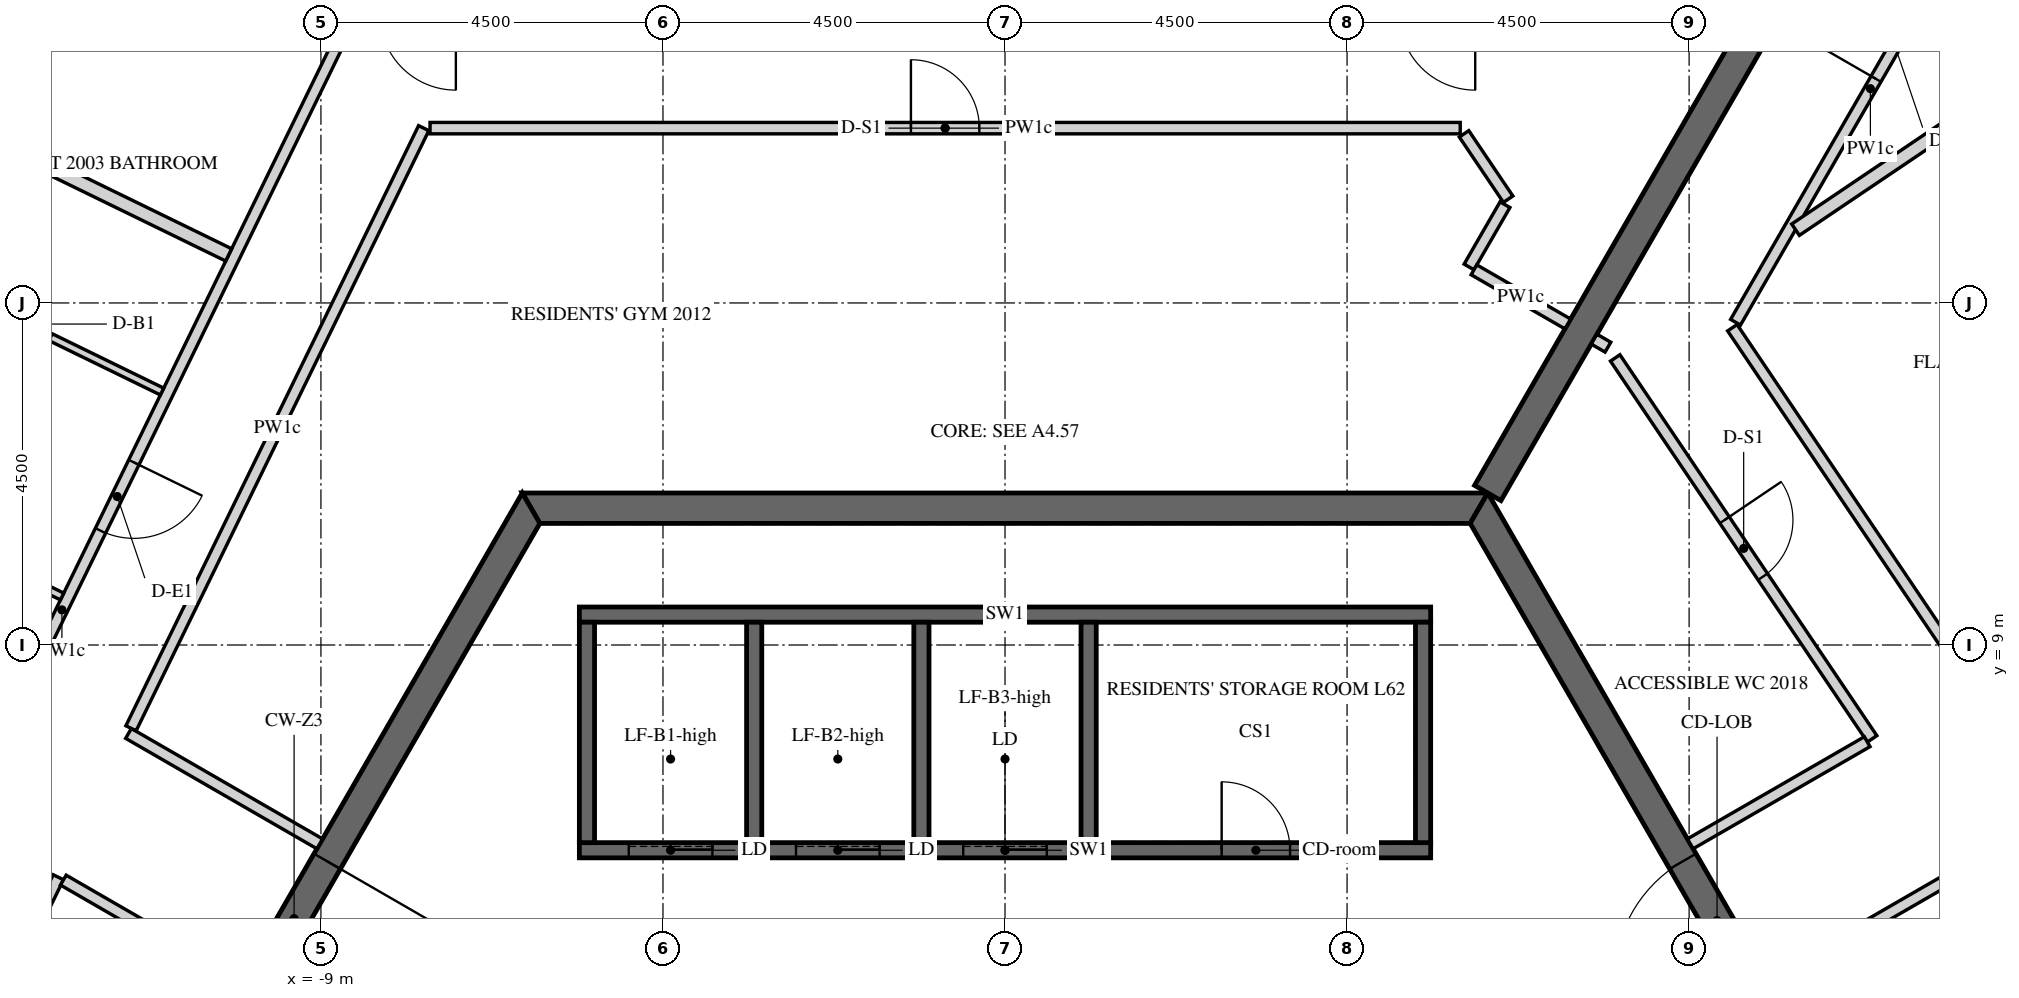
"""IFC4 building model, lengths in metres.
Left out: names, types, materials, properties, quantities, classifications, styles, units other than length and angle.
Written with IfcOpenShell. Run it as: python <this file> out.ifc"""

import sys

from ifc_helpers import new_model, si_unit, direction, frame, frame_2d, origin, place, context, subcontext, project, spatial, polyline, rectangle, outline, extrude, element, fill, save


model = new_model("IFC4")
c1 = context("Model", 3, precision=1e-05, world=origin(), true_north=direction((0.0, 1.0)))
c2 = subcontext(c1, "Body", "Model", "MODEL_VIEW")
j1 = project(units=[si_unit("LENGTHUNIT", "METRE"), si_unit("PLANEANGLEUNIT", "RADIAN")], contexts=[c1])
p1 = place(None, origin())
s1 = spatial("IfcSite", under=j1, at=p1, CompositionType="ELEMENT")
p2 = place(p1, origin())
s2 = spatial("IfcBuilding", under=s1, at=p2, CompositionType="ELEMENT")
p3 = place(p2, frame((0.0, 0.0, 260.1)))
s3 = spatial("IfcBuildingStorey", under=s2, at=p3, CompositionType="ELEMENT", Elevation=260.1)
p4 = place(p3, frame((-6.235, 10.8, -0.15), z_axis=(0.0, 0.0, 1.0), x_axis=(-0.499996419489, -0.866027470984, 0.0)))
e1 = element("IfcWall", 1, at=p4, inside=s3, PredefinedType="SHEAR", context=c2, shape_type="SweptSolid", body=[
    extrude(outline(polyline([(-0.115, -0.2), (12.586, -0.2), (12.355, 0.2), (0.115, 0.2), (-0.115, -0.2)])), origin(), (0.0, 0.0, 1.0), 3.9),
])
p5 = place(p4, frame((5.364, 0.0, 0.15)))
e2 = element("IfcOpeningElement", 2, at=p5, cuts=e1, PredefinedType="OPENING", context=c2, shape_type="SweptSolid", body=[
    extrude(rectangle(XDim=1.8, YDim=2.4, at=frame_2d((0.9, 1.2))), frame((0.0, 0.21, 0.0), z_axis=(0.0, -1.0, 0.0), x_axis=(1.0, 0.0, 0.0)), (0.0, 0.0, 1.0), 0.42),
])
p6 = place(p3, frame((12.471, 0.0, -0.15), z_axis=(0.0, 0.0, 1.0), x_axis=(-0.499996419489, 0.866027470984, 0.0)))
e3 = element("IfcWall", 3, at=p6, inside=s3, PredefinedType="SHEAR", context=c2, shape_type="SweptSolid", body=[
    extrude(outline(polyline([(-0.115, -0.2), (12.586, -0.2), (12.355, 0.2), (0.115, 0.2), (-0.115, -0.2)])), origin(), (0.0, 0.0, 1.0), 3.9),
])
p7 = place(p6, frame((5.306, 0.0, 0.15)))
e4 = element("IfcOpeningElement", 4, at=p7, cuts=e3, PredefinedType="OPENING", context=c2, shape_type="SweptSolid", body=[
    extrude(rectangle(XDim=1.8, YDim=2.4, at=frame_2d((0.9, 1.2))), frame((0.0, 0.21, 0.0), z_axis=(0.0, -1.0, 0.0), x_axis=(1.0, 0.0, 0.0)), (0.0, 0.0, 1.0), 0.42),
])
p8 = place(p3, frame((6.235, 10.8, -0.15), z_axis=(0.0, 0.0, 1.0), x_axis=(-1.0, 0.0, 0.0)))
e5 = element("IfcWall", 5, at=p8, inside=s3, PredefinedType="SHEAR", context=c2, shape_type="SweptSolid", body=[
    extrude(outline(polyline([(-0.115, -0.2), (12.586, -0.2), (12.355, 0.2), (0.115, 0.2), (-0.115, -0.2)])), origin(), (0.0, 0.0, 1.0), 3.9),
])
p9 = place(p3, frame((6.351, 11.0, -0.15), z_axis=(0.0, 0.0, 1.0), x_axis=(0.499998894578, 0.866026041999, 0.0)))
e6 = element("IfcWall", 6, at=p9, inside=s3, PredefinedType="SHEAR", context=c2, shape_type="SweptSolid", body=[
    extrude(rectangle(XDim=15.544, YDim=0.4, at=frame_2d((7.772, 0.0))), origin(), (0.0, 0.0, 1.0), 3.9),
])
p10 = place(p9, frame((6.872, 0.0, 0.15)))
e7 = element("IfcOpeningElement", 7, at=p10, cuts=e6, PredefinedType="OPENING", context=c2, shape_type="SweptSolid", body=[
    extrude(rectangle(XDim=1.8, YDim=2.4, at=frame_2d((0.9, 1.2))), frame((0.0, 0.21, 0.0), z_axis=(0.0, -1.0, 0.0), x_axis=(1.0, 0.0, 0.0)), (0.0, 0.0, 1.0), 0.42),
])
p11 = place(p3, frame((-5.6, 6.3, -0.25), z_axis=(0.0, 0.0, 1.0), x_axis=(1.0, 0.0, 0.0)))
e8 = element("IfcWall", 8, at=p11, inside=s3, PredefinedType="SHEAR", context=c2, shape_type="SweptSolid", body=[
    extrude(rectangle(XDim=11.2, YDim=0.2, at=frame_2d((5.6, 0.0))), origin(), (0.0, 0.0, 1.0), 3.9),
])
p12 = place(p11, frame((8.45, 0.0, 0.25)))
e9 = element("IfcOpeningElement", 9, at=p12, cuts=e8, PredefinedType="OPENING", context=c2, shape_type="SweptSolid", body=[
    extrude(rectangle(XDim=0.9, YDim=2.1, at=frame_2d((0.45, 1.05))), frame((0.0, 0.11, 0.0), z_axis=(0.0, -1.0, 0.0), x_axis=(1.0, 0.0, 0.0)), (0.0, 0.0, 1.0), 0.22),
])
p13 = place(p11, frame((0.65, 0.0, 0.25)))
e10 = element("IfcOpeningElement", 10, at=p13, cuts=e8, PredefinedType="OPENING", context=c2, shape_type="SweptSolid", body=[
    extrude(rectangle(XDim=1.1, YDim=2.1, at=frame_2d((0.55, 1.05))), frame((0.0, 0.11, 0.0), z_axis=(0.0, -1.0, 0.0), x_axis=(1.0, 0.0, 0.0)), (0.0, 0.0, 1.0), 0.22),
])
p14 = place(p11, frame((2.85, 0.0, 0.25)))
e11 = element("IfcOpeningElement", 11, at=p14, cuts=e8, PredefinedType="OPENING", context=c2, shape_type="SweptSolid", body=[
    extrude(rectangle(XDim=1.1, YDim=2.1, at=frame_2d((0.55, 1.05))), frame((0.0, 0.11, 0.0), z_axis=(0.0, -1.0, 0.0), x_axis=(1.0, 0.0, 0.0)), (0.0, 0.0, 1.0), 0.22),
])
p15 = place(p11, frame((5.05, 0.0, 0.25)))
e12 = element("IfcOpeningElement", 12, at=p15, cuts=e8, PredefinedType="OPENING", context=c2, shape_type="SweptSolid", body=[
    extrude(rectangle(XDim=1.1, YDim=2.1, at=frame_2d((0.55, 1.05))), frame((0.0, 0.11, 0.0), z_axis=(0.0, -1.0, 0.0), x_axis=(1.0, 0.0, 0.0)), (0.0, 0.0, 1.0), 0.22),
])
p16 = place(p3, frame((-5.6, 9.4, -0.25), z_axis=(0.0, 0.0, 1.0), x_axis=(1.0, 0.0, 0.0)))
e13 = element("IfcWall", 13, at=p16, inside=s3, PredefinedType="SHEAR", context=c2, shape_type="SweptSolid", body=[
    extrude(rectangle(XDim=11.2, YDim=0.2, at=frame_2d((5.6, 0.0))), origin(), (0.0, 0.0, 1.0), 3.9),
])
for number, where, z_axis, x_axis in (
    (14, (-5.5, 6.4, -0.25), (0.0, 0.0, 1.0), (0.0, 1.0, 0.0)),
    (15, (-3.3, 6.4, -0.25), (0.0, 0.0, 1.0), (0.0, 1.0, 0.0)),
    (16, (-1.1, 6.4, -0.25), (0.0, 0.0, 1.0), (0.0, 1.0, 0.0)),
    (17, (1.1, 6.4, -0.25), (0.0, 0.0, 1.0), (0.0, 1.0, 0.0)),
    (18, (5.5, 6.4, -0.25), (0.0, 0.0, 1.0), (0.0, 1.0, 0.0)),
):
    element("IfcWall", number, at=place(p3, frame(where, z_axis=z_axis, x_axis=x_axis)), inside=s3, PredefinedType="SHEAR", context=c2, shape_type="SweptSolid", body=[
        extrude(rectangle(XDim=2.9, YDim=0.2, at=frame_2d((1.45, 0.0))), origin(), (0.0, 0.0, 1.0), 3.9),
    ])
p17 = place(p3, frame((-8.622, 17.225, 0.0), z_axis=(0.0, 0.0, 1.0), x_axis=(-0.438366544921, -0.898796290765, 0.0)))
e19 = element("IfcWall", 19, at=p17, inside=s3, PredefinedType="PARTITIONING", context=c2, shape_type="SweptSolid", body=[
    extrude(rectangle(XDim=17.273, YDim=0.15, at=frame_2d((8.637, 0.0))), origin(), (0.0, 0.0, 1.0), 2.823),
])
p18 = place(p17, frame((6.478, 0.0, 0.0)))
e20 = element("IfcOpeningElement", 20, at=p18, cuts=e19, PredefinedType="OPENING", context=c2, shape_type="SweptSolid", body=[
    extrude(rectangle(XDim=1.0, YDim=2.1, at=frame_2d((0.5, 1.05))), frame((0.0, 0.085, 0.0), z_axis=(0.0, -1.0, 0.0), x_axis=(1.0, 0.0, 0.0)), (0.0, 0.0, 1.0), 0.17),
])
p19 = place(p3, frame((-9.016, 6.384, 0.0), z_axis=(0.0, 0.0, 1.0), x_axis=(-0.866010648346, 0.500025556299, 0.0)))
e21 = element("IfcWall", 21, at=p19, inside=s3, PredefinedType="PARTITIONING", context=c2, shape_type="SweptSolid", body=[
    extrude(rectangle(XDim=2.905, YDim=0.15, at=frame_2d((1.453, 0.0))), origin(), (0.0, 0.0, 1.0), 2.823),
])
p20 = place(p3, frame((-11.499, 7.905, 0.0), z_axis=(0.0, 0.0, 1.0), x_axis=(0.438365041944, 0.898797023805, 0.0)))
e22 = element("IfcWall", 22, at=p20, inside=s3, PredefinedType="PARTITIONING", context=c2, shape_type="SweptSolid", body=[
    extrude(rectangle(XDim=8.784, YDim=0.15, at=frame_2d((4.392, 0.0))), origin(), (0.0, 0.0, 1.0), 2.823),
])
p21 = place(p3, frame((-7.564, 15.8, 0.0), z_axis=(0.0, 0.0, 1.0), x_axis=(1.0, 0.0, 0.0)))
e23 = element("IfcWall", 23, at=p21, inside=s3, PredefinedType="PARTITIONING", context=c2, shape_type="SweptSolid", body=[
    extrude(rectangle(XDim=13.553, YDim=0.15, at=frame_2d((6.776, 0.0))), origin(), (0.0, 0.0, 1.0), 2.823),
])
p22 = place(p21, frame((6.326, 0.0, 0.0)))
e24 = element("IfcOpeningElement", 24, at=p22, cuts=e23, PredefinedType="OPENING", context=c2, shape_type="SweptSolid", body=[
    extrude(rectangle(XDim=0.9, YDim=2.1, at=frame_2d((0.45, 1.05))), frame((0.0, 0.085, 0.0), z_axis=(0.0, -1.0, 0.0), x_axis=(1.0, 0.0, 0.0)), (0.0, 0.0, 1.0), 0.17),
])
p23 = place(p3, frame((6.039, 15.725, 0.0), z_axis=(0.0, 0.0, 1.0), x_axis=(0.559307154107, -0.828960498073, 0.0)))
e25 = element("IfcWall", 25, at=p23, inside=s3, PredefinedType="PARTITIONING", context=c2, shape_type="SweptSolid", body=[
    extrude(rectangle(XDim=1.038, YDim=0.15, at=frame_2d((0.519, 0.0))), origin(), (0.0, 0.0, 1.0), 2.823),
])
p24 = place(p3, frame((6.578, 14.793, 0.0), z_axis=(0.0, 0.0, 1.0), x_axis=(-0.499998034377, -0.866026538634, 0.0)))
e26 = element("IfcWall", 26, at=p24, inside=s3, PredefinedType="PARTITIONING", context=c2, shape_type="SweptSolid", body=[
    extrude(rectangle(XDim=0.946, YDim=0.15, at=frame_2d((0.473, 0.0))), origin(), (0.0, 0.0, 1.0), 2.823),
])
p25 = place(p3, frame((6.17, 13.936, 0.0), z_axis=(0.0, 0.0, 1.0), x_axis=(0.865988727248, -0.500063520245, 0.0)))
e27 = element("IfcWall", 27, at=p25, inside=s3, PredefinedType="PARTITIONING", context=c2, shape_type="SweptSolid", body=[
    extrude(rectangle(XDim=1.425, YDim=0.15, at=frame_2d((0.712, 0.0))), origin(), (0.0, 0.0, 1.0), 2.823),
])
p26 = place(p3, frame((-15.079, 0.564, 0.0), z_axis=(0.0, 0.0, 1.0), x_axis=(0.438367391904, 0.898795877669, 0.0)))
e28 = element("IfcWall", 28, at=p26, inside=s3, PredefinedType="PARTITIONING", context=c2, shape_type="SweptSolid", body=[
    extrude(rectangle(XDim=5.987, YDim=0.15, at=frame_2d((2.994, 0.0))), origin(), (0.0, 0.0, 1.0), 2.823),
])
p27 = place(p26, frame((2.543, 0.0, 0.0)))
e29 = element("IfcOpeningElement", 29, at=p27, cuts=e28, PredefinedType="OPENING", context=c2, shape_type="SweptSolid", body=[
    extrude(rectangle(XDim=0.9, YDim=2.1, at=frame_2d((0.45, 1.05))), frame((0.0, 0.085, 0.0), z_axis=(0.0, -1.0, 0.0), x_axis=(1.0, 0.0, 0.0)), (0.0, 0.0, 1.0), 0.17),
])
p28 = place(p3, frame((-12.389, 5.907, 0.0), z_axis=(0.0, 0.0, 1.0), x_axis=(0.866034066097, -0.499984996134, 0.0)))
e30 = element("IfcWall", 30, at=p28, inside=s3, PredefinedType="PARTITIONING", context=c2, shape_type="SweptSolid", body=[
    extrude(rectangle(XDim=2.683, YDim=0.15, at=frame_2d((1.342, 0.0))), origin(), (0.0, 0.0, 1.0), 2.823),
])
p29 = place(p3, frame((19.228, -1.146, 0.0), z_axis=(0.0, 0.0, 1.0), x_axis=(-0.559190017735, 0.829039519001, 0.0)))
e31 = element("IfcWall", 31, at=p29, inside=s3, PredefinedType="PARTITIONING", context=c2, shape_type="SweptSolid", body=[
    extrude(rectangle(XDim=17.273, YDim=0.15, at=frame_2d((8.637, 0.0))), origin(), (0.0, 0.0, 1.0), 2.823),
])
p30 = place(p29, frame((6.478, 0.0, 0.0)))
e32 = element("IfcOpeningElement", 32, at=p30, cuts=e31, PredefinedType="OPENING", context=c2, shape_type="SweptSolid", body=[
    extrude(rectangle(XDim=1.0, YDim=2.1, at=frame_2d((0.5, 1.05))), frame((0.0, 0.085, 0.0), z_axis=(0.0, -1.0, 0.0), x_axis=(1.0, 0.0, 0.0)), (0.0, 0.0, 1.0), 0.17),
])
p31 = place(p3, frame((9.611, 13.246, 0.0), z_axis=(0.0, 0.0, 1.0), x_axis=(0.499994435258, 0.866028616566, 0.0)))
e33 = element("IfcWall", 33, at=p31, inside=s3, PredefinedType="PARTITIONING", context=c2, shape_type="SweptSolid", body=[
    extrude(rectangle(XDim=7.097, YDim=0.15, at=frame_2d((3.548, 0.0))), origin(), (0.0, 0.0, 1.0), 2.823),
])
p32 = place(p31, frame((3.696, 0.0, 0.0)))
e34 = element("IfcOpeningElement", 34, at=p32, cuts=e33, PredefinedType="OPENING", context=c2, shape_type="SweptSolid", body=[
    extrude(rectangle(XDim=1.0, YDim=2.1, at=frame_2d((0.5, 1.05))), frame((0.0, 0.085, 0.0), z_axis=(0.0, -1.0, 0.0), x_axis=(1.0, 0.0, 0.0)), (0.0, 0.0, 1.0), 0.17),
])
p33 = place(p3, frame((10.066, 4.566, 0.0), z_axis=(0.0, 0.0, 1.0), x_axis=(0.866034661658, 0.49998396455, 0.0)))
e35 = element("IfcWall", 35, at=p33, inside=s3, PredefinedType="PARTITIONING", context=c2, shape_type="SweptSolid", body=[
    extrude(rectangle(XDim=2.909, YDim=0.15, at=frame_2d((1.455, 0.0))), origin(), (0.0, 0.0, 1.0), 2.823),
])
p34 = place(p3, frame((7.75, 13.024, 0.0), z_axis=(0.0, 0.0, 1.0), x_axis=(0.866088799389, -0.499890179513, 0.0)))
e36 = element("IfcWall", 36, at=p34, inside=s3, PredefinedType="PARTITIONING", context=c2, shape_type="SweptSolid", body=[
    extrude(rectangle(XDim=0.21, YDim=0.15, at=frame_2d((0.105, 0.0))), origin(), (0.0, 0.0, 1.0), 2.823),
])
p35 = place(p3, frame((8.028, 12.777, 0.0), z_axis=(0.0, 0.0, 1.0), x_axis=(0.559175239609, -0.829049486707, 0.0)))
e37 = element("IfcWall", 37, at=p35, inside=s3, PredefinedType="PARTITIONING", context=c2, shape_type="SweptSolid", body=[
    extrude(rectangle(XDim=6.045, YDim=0.15, at=frame_2d((3.022, 0.0))), origin(), (0.0, 0.0, 1.0), 2.823),
])
p36 = place(p35, frame((2.572, 0.0, 0.0)))
e38 = element("IfcOpeningElement", 38, at=p36, cuts=e37, PredefinedType="OPENING", context=c2, shape_type="SweptSolid", body=[
    extrude(rectangle(XDim=0.9, YDim=2.1, at=frame_2d((0.45, 1.05))), frame((0.0, 0.085, 0.0), z_axis=(0.0, -1.0, 0.0), x_axis=(1.0, 0.0, 0.0)), (0.0, 0.0, 1.0), 0.17),
])
p37 = place(p3, frame((11.343, 7.728, 0.0), z_axis=(0.0, 0.0, 1.0), x_axis=(-0.866037314867, -0.499979368833, 0.0)))
e39 = element("IfcWall", 39, at=p37, inside=s3, PredefinedType="PARTITIONING", context=c2, shape_type="SweptSolid", body=[
    extrude(rectangle(XDim=2.687, YDim=0.15, at=frame_2d((1.344, 0.0))), origin(), (0.0, 0.0, 1.0), 2.823),
])
p38 = place(p3, frame((-17.516, 17.694, 0.0), z_axis=(0.0, 0.0, 1.0), x_axis=(0.898794723364, -0.438369758597, 0.0)))
e40 = element("IfcWall", 40, at=p38, inside=s3, PredefinedType="PARTITIONING", context=c2, shape_type="SweptSolid", body=[
    extrude(rectangle(XDim=8.125, YDim=0.18, at=frame_2d((4.062, 0.0))), origin(), (0.0, 0.0, 1.0), 2.823),
])
p39 = place(p3, frame((-12.405, 9.638, 0.0), z_axis=(0.0, 0.0, 1.0), x_axis=(-0.898810534939, 0.438337338454, 0.0)))
e41 = element("IfcWall", 41, at=p39, inside=s3, PredefinedType="PARTITIONING", context=c2, shape_type="SweptSolid", body=[
    extrude(rectangle(XDim=4.125, YDim=0.1, at=frame_2d((2.062, 0.0))), origin(), (0.0, 0.0, 1.0), 2.823),
])
p40 = place(p39, frame((1.575, 0.0, 0.0)))
e42 = element("IfcOpeningElement", 42, at=p40, cuts=e41, PredefinedType="OPENING", context=c2, shape_type="SweptSolid", body=[
    extrude(rectangle(XDim=0.9, YDim=2.1, at=frame_2d((0.45, 1.05))), frame((0.0, 0.06, 0.0), z_axis=(0.0, -1.0, 0.0), x_axis=(1.0, 0.0, 0.0)), (0.0, 0.0, 1.0), 0.12),
])
p41 = place(p3, frame((-11.09, 12.335, 0.0), z_axis=(0.0, 0.0, 1.0), x_axis=(-0.898787215731, 0.438385151252, 0.0)))
e43 = element("IfcWall", 43, at=p41, inside=s3, PredefinedType="PARTITIONING", context=c2, shape_type="SweptSolid", body=[
    extrude(rectangle(XDim=4.125, YDim=0.1, at=frame_2d((2.062, 0.0))), origin(), (0.0, 0.0, 1.0), 2.823),
])
p42 = place(p41, frame((1.625, 0.0, 0.0)))
e44 = element("IfcOpeningElement", 44, at=p42, cuts=e43, PredefinedType="OPENING", context=c2, shape_type="SweptSolid", body=[
    extrude(rectangle(XDim=0.8, YDim=2.1, at=frame_2d((0.4, 1.05))), frame((0.0, 0.06, 0.0), z_axis=(0.0, -1.0, 0.0), x_axis=(1.0, 0.0, 0.0)), (0.0, 0.0, 1.0), 0.12),
])
p43 = place(p3, frame((16.029, 18.26, 0.0), z_axis=(0.0, 0.0, 1.0), x_axis=(-0.82904538001, -0.559181328268, 0.0)))
e45 = element("IfcWall", 45, at=p43, inside=s3, PredefinedType="PARTITIONING", context=c2, shape_type="SweptSolid", body=[
    extrude(rectangle(XDim=6.79, YDim=0.18, at=frame_2d((3.395, 0.0))), origin(), (0.0, 0.0, 1.0), 2.823),
])
p44 = place(p5, origin())
e46 = element("IfcDoor", 46, at=p44, inside=s3, OperationType="DOUBLE_DOOR_SINGLE_SWING", PredefinedType="DOOR", context=c2, shape_type="SweptSolid", body=[
    extrude(rectangle(XDim=1.8, YDim=2.4, at=frame_2d((0.9, 1.2))), frame((0.0, 0.025, 0.0), z_axis=(0.0, -1.0, 0.0), x_axis=(1.0, 0.0, 0.0)), (0.0, 0.0, 1.0), 0.05),
])
fill(e2, e46)
p45 = place(p7, origin())
e47 = element("IfcDoor", 47, at=p45, inside=s3, OperationType="DOUBLE_DOOR_SINGLE_SWING", PredefinedType="DOOR", context=c2, shape_type="SweptSolid", body=[
    extrude(rectangle(XDim=1.8, YDim=2.4, at=frame_2d((0.9, 1.2))), frame((0.0, 0.025, 0.0), z_axis=(0.0, -1.0, 0.0), x_axis=(1.0, 0.0, 0.0)), (0.0, 0.0, 1.0), 0.05),
])
fill(e4, e47)
p46 = place(p12, origin())
e48 = element("IfcDoor", 48, at=p46, inside=s3, OperationType="SINGLE_SWING_LEFT", PredefinedType="DOOR", context=c2, shape_type="SweptSolid", body=[
    extrude(rectangle(XDim=0.9, YDim=2.1, at=frame_2d((0.45, 1.05))), frame((0.0, 0.025, 0.0), z_axis=(0.0, -1.0, 0.0), x_axis=(1.0, 0.0, 0.0)), (0.0, 0.0, 1.0), 0.05),
])
fill(e9, e48)
p47 = place(p13, origin())
e49 = element("IfcDoor", 49, at=p47, inside=s3, OperationType="SLIDING_TO_LEFT", PredefinedType="DOOR", context=c2, shape_type="SweptSolid", body=[
    extrude(rectangle(XDim=1.1, YDim=2.1, at=frame_2d((0.55, 1.05))), frame((0.0, 0.025, 0.0), z_axis=(0.0, -1.0, 0.0), x_axis=(1.0, 0.0, 0.0)), (0.0, 0.0, 1.0), 0.05),
])
fill(e10, e49)
p48 = place(p14, origin())
e50 = element("IfcDoor", 50, at=p48, inside=s3, OperationType="SLIDING_TO_LEFT", PredefinedType="DOOR", context=c2, shape_type="SweptSolid", body=[
    extrude(rectangle(XDim=1.1, YDim=2.1, at=frame_2d((0.55, 1.05))), frame((0.0, 0.025, 0.0), z_axis=(0.0, -1.0, 0.0), x_axis=(1.0, 0.0, 0.0)), (0.0, 0.0, 1.0), 0.05),
])
fill(e11, e50)
p49 = place(p15, origin())
e51 = element("IfcDoor", 51, at=p49, inside=s3, OperationType="SLIDING_TO_LEFT", PredefinedType="DOOR", context=c2, shape_type="SweptSolid", body=[
    extrude(rectangle(XDim=1.1, YDim=2.1, at=frame_2d((0.55, 1.05))), frame((0.0, 0.025, 0.0), z_axis=(0.0, -1.0, 0.0), x_axis=(1.0, 0.0, 0.0)), (0.0, 0.0, 1.0), 0.05),
])
fill(e12, e51)
p50 = place(p18, origin())
e52 = element("IfcDoor", 52, at=p50, inside=s3, OperationType="SINGLE_SWING_RIGHT", PredefinedType="DOOR", context=c2, shape_type="SweptSolid", body=[
    extrude(rectangle(XDim=1.0, YDim=2.1, at=frame_2d((0.5, 1.05))), frame((0.0, 0.025, 0.0), z_axis=(0.0, -1.0, 0.0), x_axis=(1.0, 0.0, 0.0)), (0.0, 0.0, 1.0), 0.05),
])
fill(e20, e52)
p51 = place(p32, origin())
e53 = element("IfcDoor", 53, at=p51, inside=s3, OperationType="SINGLE_SWING_RIGHT", PredefinedType="DOOR", context=c2, shape_type="SweptSolid", body=[
    extrude(rectangle(XDim=1.0, YDim=2.1, at=frame_2d((0.5, 1.05))), frame((0.0, 0.025, 0.0), z_axis=(0.0, -1.0, 0.0), x_axis=(1.0, 0.0, 0.0)), (0.0, 0.0, 1.0), 0.05),
])
fill(e34, e53)
p52 = place(p22, origin())
e54 = element("IfcDoor", 54, at=p52, inside=s3, OperationType="SINGLE_SWING_LEFT", PredefinedType="DOOR", context=c2, shape_type="SweptSolid", body=[
    extrude(rectangle(XDim=0.9, YDim=2.1, at=frame_2d((0.45, 1.05))), frame((0.0, 0.025, 0.0), z_axis=(0.0, -1.0, 0.0), x_axis=(1.0, 0.0, 0.0)), (0.0, 0.0, 1.0), 0.05),
])
fill(e24, e54)
p53 = place(p36, origin())
e55 = element("IfcDoor", 55, at=p53, inside=s3, OperationType="SINGLE_SWING_RIGHT", PredefinedType="DOOR", context=c2, shape_type="SweptSolid", body=[
    extrude(rectangle(XDim=0.9, YDim=2.1, at=frame_2d((0.45, 1.05))), frame((0.0, 0.025, 0.0), z_axis=(0.0, -1.0, 0.0), x_axis=(1.0, 0.0, 0.0)), (0.0, 0.0, 1.0), 0.05),
])
fill(e38, e55)
save(model, sys.argv[1])
